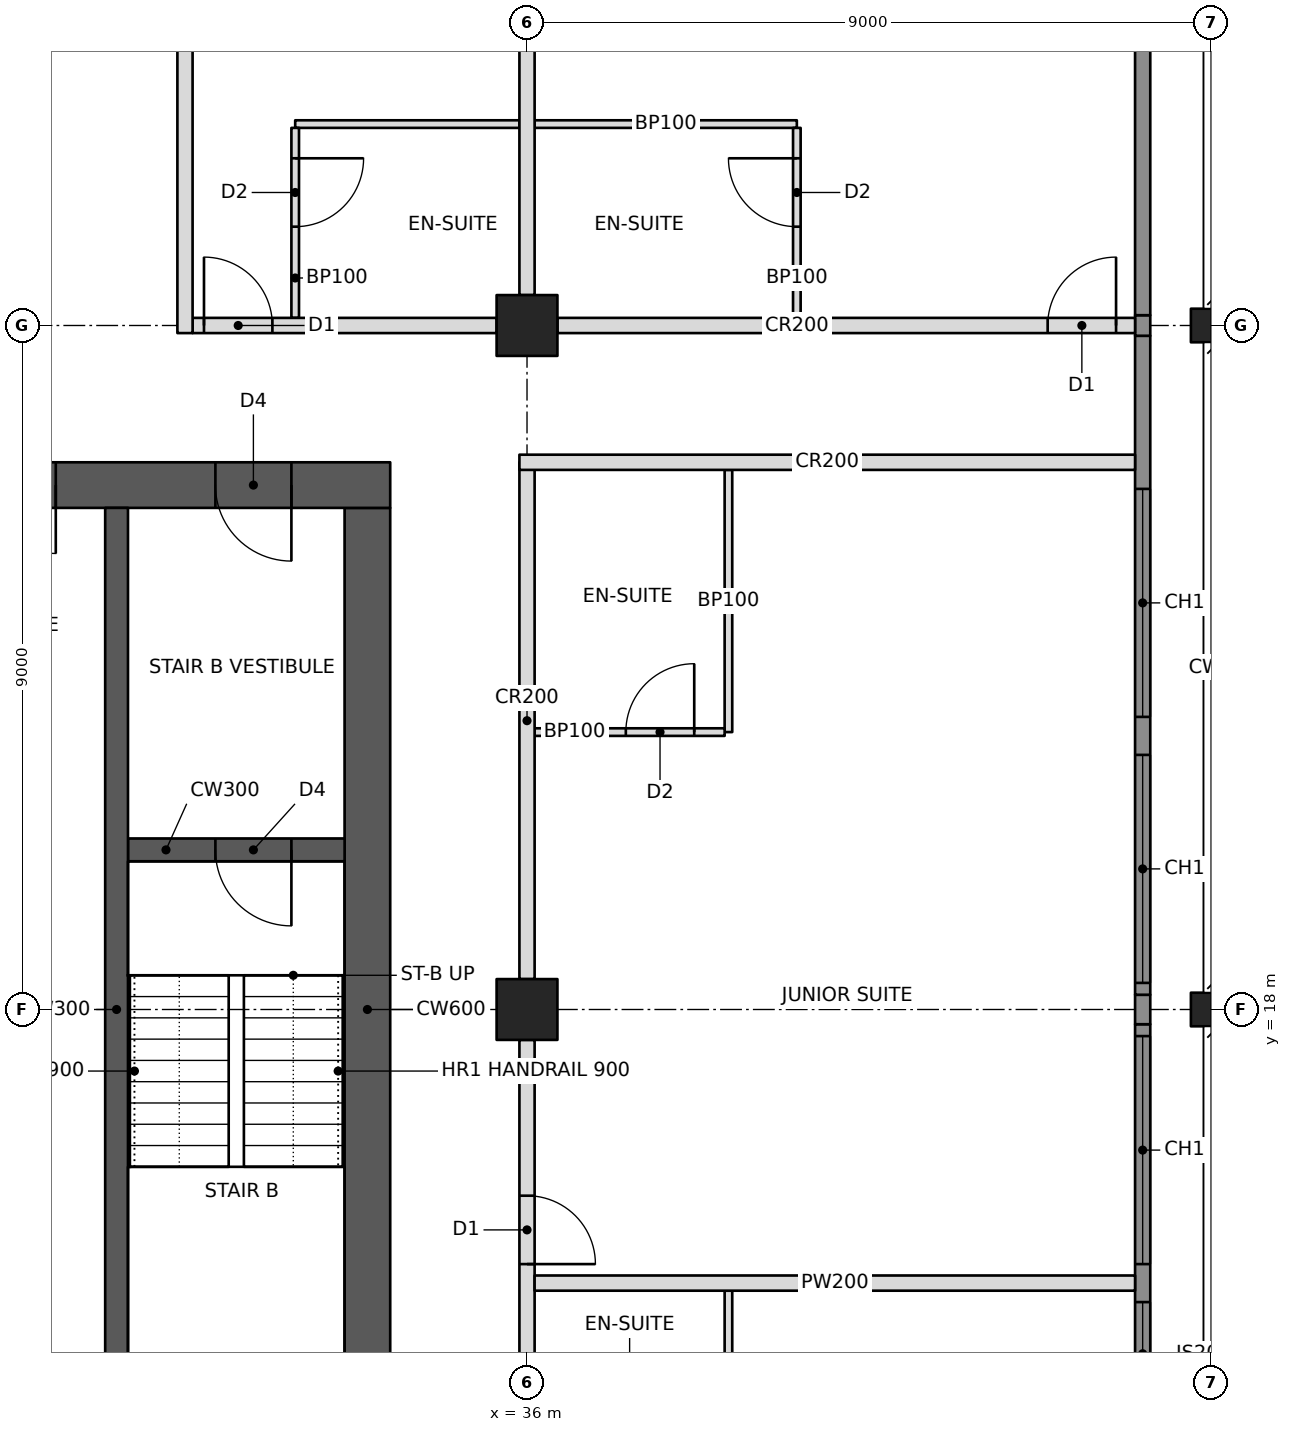
"""IFC4 building model, lengths in metres.
Left out: names, types, materials, properties, quantities, classifications, styles, units other than length and angle.
Written with IfcOpenShell. Run it as: python <this file> out.ifc"""

import sys

from ifc_helpers import new_model, si_unit, direction, frame, frame_2d, origin, origin_2d, place, context, subcontext, project, spatial, rectangle, hollow_rectangle, i_section, extrude, element, fill, save


model = new_model("IFC4")
c1 = context("Model", 3, precision=1e-05, world=origin(), true_north=direction((0.0, 1.0)))
c2 = subcontext(c1, "Body", "Model", "MODEL_VIEW")
j1 = project(units=[si_unit("LENGTHUNIT", "METRE"), si_unit("PLANEANGLEUNIT", "RADIAN")], contexts=[c1])
p1 = place(None, origin())
s1 = spatial("IfcSite", under=j1, at=p1, CompositionType="ELEMENT")
p2 = place(p1, origin())
s2 = spatial("IfcBuilding", under=s1, at=p2, CompositionType="ELEMENT")
p3 = place(p2, frame((0.0, 0.0, 124.8)))
s3 = spatial("IfcBuildingStorey", under=s2, at=p3, CompositionType="ELEMENT", Elevation=124.8)
for number, where, z_axis, x_axis in (
    (1, (36.0, 18.0, 0.0), (0.0, 0.0, 1.0), (0.0, 1.0, 0.0)),
    (2, (36.0, 27.0, 0.0), (0.0, 0.0, 1.0), (1.0, 0.0, 0.0)),
):
    element("IfcColumn", number, at=place(p3, frame(where, z_axis=z_axis, x_axis=x_axis)), inside=s3, PredefinedType="COLUMN", context=c2, shape_type="SweptSolid", body=[
        extrude(hollow_rectangle(XDim=0.8, YDim=0.8, WallThickness=0.07, at=origin_2d()), origin(), (0.0, 0.0, 1.0), 3.4),
    ])
for number, where, z_axis, x_axis in (
    (3, (45.0, 18.0, 0.0), (0.0, 0.0, 1.0), (0.0, 1.0, 0.0)),
    (4, (45.0, 27.0, 0.0), (0.0, 0.0, 1.0), (0.0, 1.0, 0.0)),
):
    element("IfcColumn", number, at=place(p3, frame(where, z_axis=z_axis, x_axis=x_axis)), inside=s3, PredefinedType="COLUMN", context=c2, shape_type="SweptSolid", body=[
        extrude(i_section(OverallWidth=0.442, OverallDepth=0.531, WebThickness=0.066, FlangeThickness=0.106, at=origin_2d()), origin(), (0.0, 0.0, 1.0), 3.4),
    ])
p4 = place(p3, frame((10.8, 24.9, 0.0), z_axis=(0.0, 0.0, 1.0), x_axis=(1.0, 0.0, 0.0)))
e5 = element("IfcWall", 5, at=p4, inside=s3, PredefinedType="SHEAR", context=c2, shape_type="SweptSolid", body=[
    extrude(rectangle(XDim=23.4, YDim=0.6, at=frame_2d((11.7, 0.0))), origin(), (0.0, 0.0, 1.0), 3.4),
])
p5 = place(p4, frame((17.2, 0.0, 0.0)))
e6 = element("IfcOpeningElement", 6, at=p5, cuts=e5, PredefinedType="OPENING", context=c2, shape_type="SweptSolid", body=[
    extrude(rectangle(XDim=1.8, YDim=2.1, at=frame_2d((0.9, 1.05))), frame((0.0, 0.31, 0.0), z_axis=(0.0, -1.0, 0.0), x_axis=(1.0, 0.0, 0.0)), (0.0, 0.0, 1.0), 0.62),
])
p6 = place(p4, frame((21.1, 0.0, 0.0)))
e7 = element("IfcOpeningElement", 7, at=p6, cuts=e5, PredefinedType="OPENING", context=c2, shape_type="SweptSolid", body=[
    extrude(rectangle(XDim=1.0, YDim=2.1, at=frame_2d((0.5, 1.05))), frame((0.0, 0.31, 0.0), z_axis=(0.0, -1.0, 0.0), x_axis=(1.0, 0.0, 0.0)), (0.0, 0.0, 1.0), 0.62),
])
p7 = place(p3, frame((33.9, 11.4, 0.0), z_axis=(0.0, 0.0, 1.0), x_axis=(0.0, 1.0, 0.0)))
e8 = element("IfcWall", 8, at=p7, inside=s3, PredefinedType="SHEAR", context=c2, shape_type="SweptSolid", body=[
    extrude(rectangle(XDim=13.2, YDim=0.6, at=frame_2d((6.6, 0.0))), origin(), (0.0, 0.0, 1.0), 3.4),
])
p8 = place(p3, frame((30.6, 11.4, 0.0), z_axis=(0.0, 0.0, 1.0), x_axis=(0.0, 1.0, 0.0)))
e9 = element("IfcWall", 9, at=p8, inside=s3, PredefinedType="SHEAR", context=c2, shape_type="SweptSolid", body=[
    extrude(rectangle(XDim=13.2, YDim=0.3, at=frame_2d((6.6, 0.0))), origin(), (0.0, 0.0, 1.0), 3.4),
])
p9 = place(p3, frame((30.75, 20.1, 0.0), z_axis=(0.0, 0.0, 1.0), x_axis=(1.0, 0.0, 0.0)))
e10 = element("IfcWall", 10, at=p9, inside=s3, PredefinedType="SHEAR", context=c2, shape_type="SweptSolid", body=[
    extrude(rectangle(XDim=2.85, YDim=0.3, at=frame_2d((1.425, 0.0))), origin(), (0.0, 0.0, 1.0), 3.4),
])
p10 = place(p9, frame((1.15, 0.0, 0.0)))
e11 = element("IfcOpeningElement", 11, at=p10, cuts=e10, PredefinedType="OPENING", context=c2, shape_type="SweptSolid", body=[
    extrude(rectangle(XDim=1.0, YDim=2.1, at=frame_2d((0.5, 1.05))), frame((0.0, 0.16, 0.0), z_axis=(0.0, -1.0, 0.0), x_axis=(1.0, 0.0, 0.0)), (0.0, 0.0, 1.0), 0.32),
])
p11 = place(p3, frame((31.6, 27.0, 0.0), z_axis=(0.0, 0.0, 1.0), x_axis=(1.0, 0.0, 0.0)))
e12 = element("IfcWall", 12, at=p11, inside=s3, PredefinedType="PARTITIONING", context=c2, shape_type="SweptSolid", body=[
    extrude(rectangle(XDim=4.0, YDim=0.2, at=frame_2d((2.0, 0.0))), origin(), (0.0, 0.0, 1.0), 2.405),
])
p12 = place(p11, frame((0.15, 0.0, 0.0)))
e13 = element("IfcOpeningElement", 13, at=p12, cuts=e12, PredefinedType="OPENING", context=c2, shape_type="SweptSolid", body=[
    extrude(rectangle(XDim=0.9, YDim=2.1, at=frame_2d((0.45, 1.05))), frame((0.0, 0.11, 0.0), z_axis=(0.0, -1.0, 0.0), x_axis=(1.0, 0.0, 0.0)), (0.0, 0.0, 1.0), 0.22),
])
p13 = place(p3, frame((36.4, 27.0, 0.0), z_axis=(0.0, 0.0, 1.0), x_axis=(1.0, 0.0, 0.0)))
e14 = element("IfcWall", 14, at=p13, inside=s3, PredefinedType="PARTITIONING", context=c2, shape_type="SweptSolid", body=[
    extrude(rectangle(XDim=7.6, YDim=0.2, at=frame_2d((3.8, 0.0))), origin(), (0.0, 0.0, 1.0), 2.438),
])
p14 = place(p13, frame((6.45, 0.0, 0.0)))
e15 = element("IfcOpeningElement", 15, at=p14, cuts=e14, PredefinedType="OPENING", context=c2, shape_type="SweptSolid", body=[
    extrude(rectangle(XDim=0.9, YDim=2.1, at=frame_2d((0.45, 1.05))), frame((0.0, 0.11, 0.0), z_axis=(0.0, -1.0, 0.0), x_axis=(1.0, 0.0, 0.0)), (0.0, 0.0, 1.0), 0.22),
])
p15 = place(p3, frame((36.0, 10.8, 0.0), z_axis=(0.0, 0.0, 1.0), x_axis=(0.0, 1.0, 0.0)))
e16 = element("IfcWall", 16, at=p15, inside=s3, PredefinedType="PARTITIONING", context=c2, shape_type="SweptSolid", body=[
    extrude(rectangle(XDim=6.8, YDim=0.2, at=frame_2d((3.4, 0.0))), origin(), (0.0, 0.0, 1.0), 2.405),
])
p16 = place(p15, frame((0.25, 0.0, 0.0)))
e17 = element("IfcOpeningElement", 17, at=p16, cuts=e16, PredefinedType="OPENING", context=c2, shape_type="SweptSolid", body=[
    extrude(rectangle(XDim=0.9, YDim=2.1, at=frame_2d((0.45, 1.05))), frame((0.0, 0.11, 0.0), z_axis=(0.0, -1.0, 0.0), x_axis=(1.0, 0.0, 0.0)), (0.0, 0.0, 1.0), 0.22),
])
p17 = place(p15, frame((3.85, 0.0, 0.0)))
e18 = element("IfcOpeningElement", 18, at=p17, cuts=e16, PredefinedType="OPENING", context=c2, shape_type="SweptSolid", body=[
    extrude(rectangle(XDim=0.9, YDim=2.1, at=frame_2d((0.45, 1.05))), frame((0.0, 0.11, 0.0), z_axis=(0.0, -1.0, 0.0), x_axis=(1.0, 0.0, 0.0)), (0.0, 0.0, 1.0), 0.22),
])
p18 = place(p3, frame((36.0, 18.4, 0.0), z_axis=(0.0, 0.0, 1.0), x_axis=(0.0, 1.0, 0.0)))
e19 = element("IfcWall", 19, at=p18, inside=s3, PredefinedType="PARTITIONING", context=c2, shape_type="SweptSolid", body=[
    extrude(rectangle(XDim=6.8, YDim=0.2, at=frame_2d((3.4, 0.0))), origin(), (0.0, 0.0, 1.0), 2.405),
])
for number, where, z_axis, x_axis in (
    (20, (35.9, 25.2, 0.0), (0.0, 0.0, 1.0), (1.0, 0.0, 0.0)),
    (21, (31.5, 26.9, 0.0), (0.0, 0.0, 1.0), (0.0, 1.0, 0.0)),
):
    element("IfcWall", number, at=place(p3, frame(where, z_axis=z_axis, x_axis=x_axis)), inside=s3, PredefinedType="PARTITIONING", context=c2, shape_type="SweptSolid", body=[
        extrude(rectangle(XDim=8.1, YDim=0.2, at=frame_2d((4.05, 0.0))), origin(), (0.0, 0.0, 1.0), 2.404),
    ])
p19 = place(p3, frame((36.0, 27.4, 0.0), z_axis=(0.0, 0.0, 1.0), x_axis=(0.0, 1.0, 0.0)))
e22 = element("IfcWall", 22, at=p19, inside=s3, PredefinedType="PARTITIONING", context=c2, shape_type="SweptSolid", body=[
    extrude(rectangle(XDim=7.6, YDim=0.2, at=frame_2d((3.8, 0.0))), origin(), (0.0, 0.0, 1.0), 2.438),
])
p20 = place(p3, frame((32.95, 29.65, 0.0), z_axis=(0.0, 0.0, 1.0), x_axis=(1.0, 0.0, 0.0)))
e23 = element("IfcWall", 23, at=p20, inside=s3, PredefinedType="PARTITIONING", context=c2, shape_type="SweptSolid", body=[
    extrude(rectangle(XDim=2.95, YDim=0.1, at=frame_2d((1.475, 0.0))), origin(), (0.0, 0.0, 1.0), 2.438),
])
p21 = place(p3, frame((32.95, 27.1, 0.0), z_axis=(0.0, 0.0, 1.0), x_axis=(0.0, 1.0, 0.0)))
e24 = element("IfcWall", 24, at=p21, inside=s3, PredefinedType="PARTITIONING", context=c2, shape_type="SweptSolid", body=[
    extrude(rectangle(XDim=2.5, YDim=0.1, at=frame_2d((1.25, 0.0))), origin(), (0.0, 0.0, 1.0), 2.404),
])
p22 = place(p21, frame((1.2, 0.0, 0.0)))
e25 = element("IfcOpeningElement", 25, at=p22, cuts=e24, PredefinedType="OPENING", context=c2, shape_type="SweptSolid", body=[
    extrude(rectangle(XDim=0.9, YDim=2.1, at=frame_2d((0.45, 1.05))), frame((0.0, 0.06, 0.0), z_axis=(0.0, -1.0, 0.0), x_axis=(1.0, 0.0, 0.0)), (0.0, 0.0, 1.0), 0.12),
])
p23 = place(p3, frame((36.1, 29.65, 0.0), z_axis=(0.0, 0.0, 1.0), x_axis=(1.0, 0.0, 0.0)))
e26 = element("IfcWall", 26, at=p23, inside=s3, PredefinedType="PARTITIONING", context=c2, shape_type="SweptSolid", body=[
    extrude(rectangle(XDim=3.45, YDim=0.1, at=frame_2d((1.725, 0.0))), origin(), (0.0, 0.0, 1.0), 2.438),
])
p24 = place(p3, frame((39.55, 27.1, 0.0), z_axis=(0.0, 0.0, 1.0), x_axis=(0.0, 1.0, 0.0)))
e27 = element("IfcWall", 27, at=p24, inside=s3, PredefinedType="PARTITIONING", context=c2, shape_type="SweptSolid", body=[
    extrude(rectangle(XDim=2.5, YDim=0.1, at=frame_2d((1.25, 0.0))), origin(), (0.0, 0.0, 1.0), 2.438),
])
p25 = place(p24, frame((1.2, 0.0, 0.0)))
e28 = element("IfcOpeningElement", 28, at=p25, cuts=e27, PredefinedType="OPENING", context=c2, shape_type="SweptSolid", body=[
    extrude(rectangle(XDim=0.9, YDim=2.1, at=frame_2d((0.45, 1.05))), frame((0.0, 0.06, 0.0), z_axis=(0.0, -1.0, 0.0), x_axis=(1.0, 0.0, 0.0)), (0.0, 0.0, 1.0), 0.12),
])
p26 = place(p3, frame((36.1, 14.4, 0.0), z_axis=(0.0, 0.0, 1.0), x_axis=(1.0, 0.0, 0.0)))
e29 = element("IfcWall", 29, at=p26, inside=s3, PredefinedType="PARTITIONING", context=c2, shape_type="SweptSolid", body=[
    extrude(rectangle(XDim=7.9, YDim=0.2, at=frame_2d((3.95, 0.0))), origin(), (0.0, 0.0, 1.0), 2.404),
])
p27 = place(p3, frame((38.65, 12.25, 0.0), z_axis=(0.0, 0.0, 1.0), x_axis=(0.0, 1.0, 0.0)))
e30 = element("IfcWall", 30, at=p27, inside=s3, PredefinedType="PARTITIONING", context=c2, shape_type="SweptSolid", body=[
    extrude(rectangle(XDim=2.05, YDim=0.1, at=frame_2d((1.025, 0.0))), origin(), (0.0, 0.0, 1.0), 3.2),
])
p28 = place(p3, frame((38.65, 21.65, 0.0), z_axis=(0.0, 0.0, 1.0), x_axis=(0.0, 1.0, 0.0)))
e31 = element("IfcWall", 31, at=p28, inside=s3, PredefinedType="PARTITIONING", context=c2, shape_type="SweptSolid", body=[
    extrude(rectangle(XDim=3.45, YDim=0.1, at=frame_2d((1.725, 0.0))), origin(), (0.0, 0.0, 1.0), 3.2),
])
p29 = place(p3, frame((36.1, 21.65, 0.0), z_axis=(0.0, 0.0, 1.0), x_axis=(1.0, 0.0, 0.0)))
e32 = element("IfcWall", 32, at=p29, inside=s3, PredefinedType="PARTITIONING", context=c2, shape_type="SweptSolid", body=[
    extrude(rectangle(XDim=2.5, YDim=0.1, at=frame_2d((1.25, 0.0))), origin(), (0.0, 0.0, 1.0), 2.404),
])
p30 = place(p29, frame((1.2, 0.0, 0.0)))
e33 = element("IfcOpeningElement", 33, at=p30, cuts=e32, PredefinedType="OPENING", context=c2, shape_type="SweptSolid", body=[
    extrude(rectangle(XDim=0.9, YDim=2.1, at=frame_2d((0.45, 1.05))), frame((0.0, 0.06, 0.0), z_axis=(0.0, -1.0, 0.0), x_axis=(1.0, 0.0, 0.0)), (0.0, 0.0, 1.0), 0.12),
])
p31 = place(p3, frame((44.1, 9.135, 0.0), z_axis=(0.0, 0.0, 1.0), x_axis=(0.0, 1.0, 0.0)))
e34 = element("IfcWall", 34, at=p31, inside=s3, PredefinedType="SOLIDWALL", context=c2, shape_type="SweptSolid", body=[
    extrude(rectangle(XDim=8.671, YDim=0.2, at=frame_2d((4.335, 0.0))), origin(), (0.0, 0.0, 1.0), 3.2),
])
p32 = place(p31, frame((2.015, 0.0, 0.6)))
e35 = element("IfcOpeningElement", 35, at=p32, cuts=e34, PredefinedType="OPENING", context=c2, shape_type="SweptSolid", body=[
    extrude(rectangle(XDim=3.0, YDim=2.2, at=frame_2d((1.5, 1.1))), frame((0.0, 0.11, 0.0), z_axis=(0.0, -1.0, 0.0), x_axis=(1.0, 0.0, 0.0)), (0.0, 0.0, 1.0), 0.22),
])
p33 = place(p31, frame((5.515, 0.0, 0.6)))
e36 = element("IfcOpeningElement", 36, at=p33, cuts=e34, PredefinedType="OPENING", context=c2, shape_type="SweptSolid", body=[
    extrude(rectangle(XDim=3.0, YDim=2.2, at=frame_2d((1.5, 1.1))), frame((0.0, 0.11, 0.0), z_axis=(0.0, -1.0, 0.0), x_axis=(1.0, 0.0, 0.0)), (0.0, 0.0, 1.0), 0.22),
])
p34 = place(p3, frame((44.1, 17.806, 0.0), z_axis=(0.0, 0.0, 1.0), x_axis=(0.0, 1.0, 0.0)))
e37 = element("IfcWall", 37, at=p34, inside=s3, PredefinedType="SOLIDWALL", context=c2, shape_type="SweptSolid", body=[
    extrude(rectangle(XDim=0.388, YDim=0.2, at=frame_2d((0.194, 0.0))), origin(), (0.0, 0.0, 1.0), 2.404),
])
p35 = place(p3, frame((44.1, 18.194, 0.0), z_axis=(0.0, 0.0, 1.0), x_axis=(0.0, 1.0, 0.0)))
e38 = element("IfcWall", 38, at=p35, inside=s3, PredefinedType="SOLIDWALL", context=c2, shape_type="SweptSolid", body=[
    extrude(rectangle(XDim=8.671, YDim=0.2, at=frame_2d((4.335, 0.0))), origin(), (0.0, 0.0, 1.0), 3.2),
])
p36 = place(p35, frame((0.156, 0.0, 0.6)))
e39 = element("IfcOpeningElement", 39, at=p36, cuts=e38, PredefinedType="OPENING", context=c2, shape_type="SweptSolid", body=[
    extrude(rectangle(XDim=3.0, YDim=2.2, at=frame_2d((1.5, 1.1))), frame((0.0, 0.11, 0.0), z_axis=(0.0, -1.0, 0.0), x_axis=(1.0, 0.0, 0.0)), (0.0, 0.0, 1.0), 0.22),
])
p37 = place(p35, frame((3.656, 0.0, 0.6)))
e40 = element("IfcOpeningElement", 40, at=p37, cuts=e38, PredefinedType="OPENING", context=c2, shape_type="SweptSolid", body=[
    extrude(rectangle(XDim=3.0, YDim=2.2, at=frame_2d((1.5, 1.1))), frame((0.0, 0.11, 0.0), z_axis=(0.0, -1.0, 0.0), x_axis=(1.0, 0.0, 0.0)), (0.0, 0.0, 1.0), 0.22),
])
p38 = place(p3, frame((44.1, 26.865, 0.0), z_axis=(0.0, 0.0, 1.0), x_axis=(0.0, 1.0, 0.0)))
e41 = element("IfcWall", 41, at=p38, inside=s3, PredefinedType="SOLIDWALL", context=c2, shape_type="SweptSolid", body=[
    extrude(rectangle(XDim=0.271, YDim=0.2, at=frame_2d((0.135, 0.0))), origin(), (0.0, 0.0, 1.0), 2.438),
])
p39 = place(p3, frame((44.1, 27.135, 0.0), z_axis=(0.0, 0.0, 1.0), x_axis=(0.0, 1.0, 0.0)))
e42 = element("IfcWall", 42, at=p39, inside=s3, PredefinedType="SOLIDWALL", context=c2, shape_type="SweptSolid", body=[
    extrude(rectangle(XDim=4.257, YDim=0.2, at=frame_2d((2.129, 0.0))), origin(), (0.0, 0.0, 1.0), 3.2),
])
p40 = place(p32, origin())
e43 = element("IfcWindow", 43, at=p40, inside=s3, PartitioningType="TRIPLE_PANEL_VERTICAL", PredefinedType="WINDOW", context=c2, shape_type="SweptSolid", body=[
    extrude(rectangle(XDim=3.0, YDim=2.2, at=frame_2d((1.5, 1.1))), frame((0.0, 0.03, 0.0), z_axis=(0.0, -1.0, 0.0), x_axis=(1.0, 0.0, 0.0)), (0.0, 0.0, 1.0), 0.06),
])
fill(e35, e43)
p41 = place(p33, origin())
e44 = element("IfcWindow", 44, at=p41, inside=s3, PartitioningType="TRIPLE_PANEL_VERTICAL", PredefinedType="WINDOW", context=c2, shape_type="SweptSolid", body=[
    extrude(rectangle(XDim=3.0, YDim=2.2, at=frame_2d((1.5, 1.1))), frame((0.0, 0.03, 0.0), z_axis=(0.0, -1.0, 0.0), x_axis=(1.0, 0.0, 0.0)), (0.0, 0.0, 1.0), 0.06),
])
fill(e36, e44)
p42 = place(p36, origin())
e45 = element("IfcWindow", 45, at=p42, inside=s3, PartitioningType="TRIPLE_PANEL_VERTICAL", PredefinedType="WINDOW", context=c2, shape_type="SweptSolid", body=[
    extrude(rectangle(XDim=3.0, YDim=2.2, at=frame_2d((1.5, 1.1))), frame((0.0, 0.03, 0.0), z_axis=(0.0, -1.0, 0.0), x_axis=(1.0, 0.0, 0.0)), (0.0, 0.0, 1.0), 0.06),
])
fill(e39, e45)
p43 = place(p37, origin())
e46 = element("IfcWindow", 46, at=p43, inside=s3, PartitioningType="TRIPLE_PANEL_VERTICAL", PredefinedType="WINDOW", context=c2, shape_type="SweptSolid", body=[
    extrude(rectangle(XDim=3.0, YDim=2.2, at=frame_2d((1.5, 1.1))), frame((0.0, 0.03, 0.0), z_axis=(0.0, -1.0, 0.0), x_axis=(1.0, 0.0, 0.0)), (0.0, 0.0, 1.0), 0.06),
])
fill(e40, e46)
p44 = place(p22, frame((0.9, 0.0, 0.0), z_axis=(0.0, 0.0, 1.0), x_axis=(-1.0, 0.0, 0.0)))
e47 = element("IfcDoor", 47, at=p44, inside=s3, OperationType="SINGLE_SWING_LEFT", PredefinedType="DOOR", context=c2, shape_type="SweptSolid", body=[
    extrude(rectangle(XDim=0.9, YDim=2.1, at=frame_2d((0.45, 1.05))), frame((0.0, 0.025, 0.0), z_axis=(0.0, -1.0, 0.0), x_axis=(1.0, 0.0, 0.0)), (0.0, 0.0, 1.0), 0.05),
])
fill(e25, e47)
p45 = place(p12, origin())
e48 = element("IfcDoor", 48, at=p45, inside=s3, OperationType="SINGLE_SWING_LEFT", PredefinedType="DOOR", context=c2, shape_type="SweptSolid", body=[
    extrude(rectangle(XDim=0.9, YDim=2.1, at=frame_2d((0.45, 1.05))), frame((0.0, 0.025, 0.0), z_axis=(0.0, -1.0, 0.0), x_axis=(1.0, 0.0, 0.0)), (0.0, 0.0, 1.0), 0.05),
])
fill(e13, e48)
p46 = place(p25, origin())
e49 = element("IfcDoor", 49, at=p46, inside=s3, OperationType="SINGLE_SWING_RIGHT", PredefinedType="DOOR", context=c2, shape_type="SweptSolid", body=[
    extrude(rectangle(XDim=0.9, YDim=2.1, at=frame_2d((0.45, 1.05))), frame((0.0, 0.025, 0.0), z_axis=(0.0, -1.0, 0.0), x_axis=(1.0, 0.0, 0.0)), (0.0, 0.0, 1.0), 0.05),
])
fill(e28, e49)
p47 = place(p14, origin())
e50 = element("IfcDoor", 50, at=p47, inside=s3, OperationType="SINGLE_SWING_RIGHT", PredefinedType="DOOR", context=c2, shape_type="SweptSolid", body=[
    extrude(rectangle(XDim=0.9, YDim=2.1, at=frame_2d((0.45, 1.05))), frame((0.0, 0.025, 0.0), z_axis=(0.0, -1.0, 0.0), x_axis=(1.0, 0.0, 0.0)), (0.0, 0.0, 1.0), 0.05),
])
fill(e15, e50)
p48 = place(p30, origin())
e51 = element("IfcDoor", 51, at=p48, inside=s3, OperationType="SINGLE_SWING_RIGHT", PredefinedType="DOOR", context=c2, shape_type="SweptSolid", body=[
    extrude(rectangle(XDim=0.9, YDim=2.1, at=frame_2d((0.45, 1.05))), frame((0.0, 0.025, 0.0), z_axis=(0.0, -1.0, 0.0), x_axis=(1.0, 0.0, 0.0)), (0.0, 0.0, 1.0), 0.05),
])
fill(e33, e51)
p49 = place(p17, frame((0.9, 0.0, 0.0), z_axis=(0.0, 0.0, 1.0), x_axis=(-1.0, 0.0, 0.0)))
e52 = element("IfcDoor", 52, at=p49, inside=s3, OperationType="SINGLE_SWING_RIGHT", PredefinedType="DOOR", context=c2, shape_type="SweptSolid", body=[
    extrude(rectangle(XDim=0.9, YDim=2.1, at=frame_2d((0.45, 1.05))), frame((0.0, 0.025, 0.0), z_axis=(0.0, -1.0, 0.0), x_axis=(1.0, 0.0, 0.0)), (0.0, 0.0, 1.0), 0.05),
])
fill(e18, e52)
p50 = place(p5, frame((1.8, 0.0, 0.0), z_axis=(0.0, 0.0, 1.0), x_axis=(-1.0, 0.0, 0.0)))
e53 = element("IfcDoor", 53, at=p50, inside=s3, OperationType="DOUBLE_DOOR_SINGLE_SWING", PredefinedType="DOOR", context=c2, shape_type="SweptSolid", body=[
    extrude(rectangle(XDim=1.8, YDim=2.1, at=frame_2d((0.9, 1.05))), frame((0.0, 0.025, 0.0), z_axis=(0.0, -1.0, 0.0), x_axis=(1.0, 0.0, 0.0)), (0.0, 0.0, 1.0), 0.05),
])
fill(e6, e53)
p51 = place(p6, frame((1.0, 0.0, 0.0), z_axis=(0.0, 0.0, 1.0), x_axis=(-1.0, 0.0, 0.0)))
e54 = element("IfcDoor", 54, at=p51, inside=s3, OperationType="SINGLE_SWING_LEFT", PredefinedType="DOOR", context=c2, shape_type="SweptSolid", body=[
    extrude(rectangle(XDim=1.0, YDim=2.1, at=frame_2d((0.5, 1.05))), frame((0.0, 0.025, 0.0), z_axis=(0.0, -1.0, 0.0), x_axis=(1.0, 0.0, 0.0)), (0.0, 0.0, 1.0), 0.05),
])
fill(e7, e54)
p52 = place(p10, frame((1.0, 0.0, 0.0), z_axis=(0.0, 0.0, 1.0), x_axis=(-1.0, 0.0, 0.0)))
e55 = element("IfcDoor", 55, at=p52, inside=s3, OperationType="SINGLE_SWING_LEFT", PredefinedType="DOOR", context=c2, shape_type="SweptSolid", body=[
    extrude(rectangle(XDim=1.0, YDim=2.1, at=frame_2d((0.5, 1.05))), frame((0.0, 0.025, 0.0), z_axis=(0.0, -1.0, 0.0), x_axis=(1.0, 0.0, 0.0)), (0.0, 0.0, 1.0), 0.05),
])
fill(e11, e55)
save(model, sys.argv[1])
